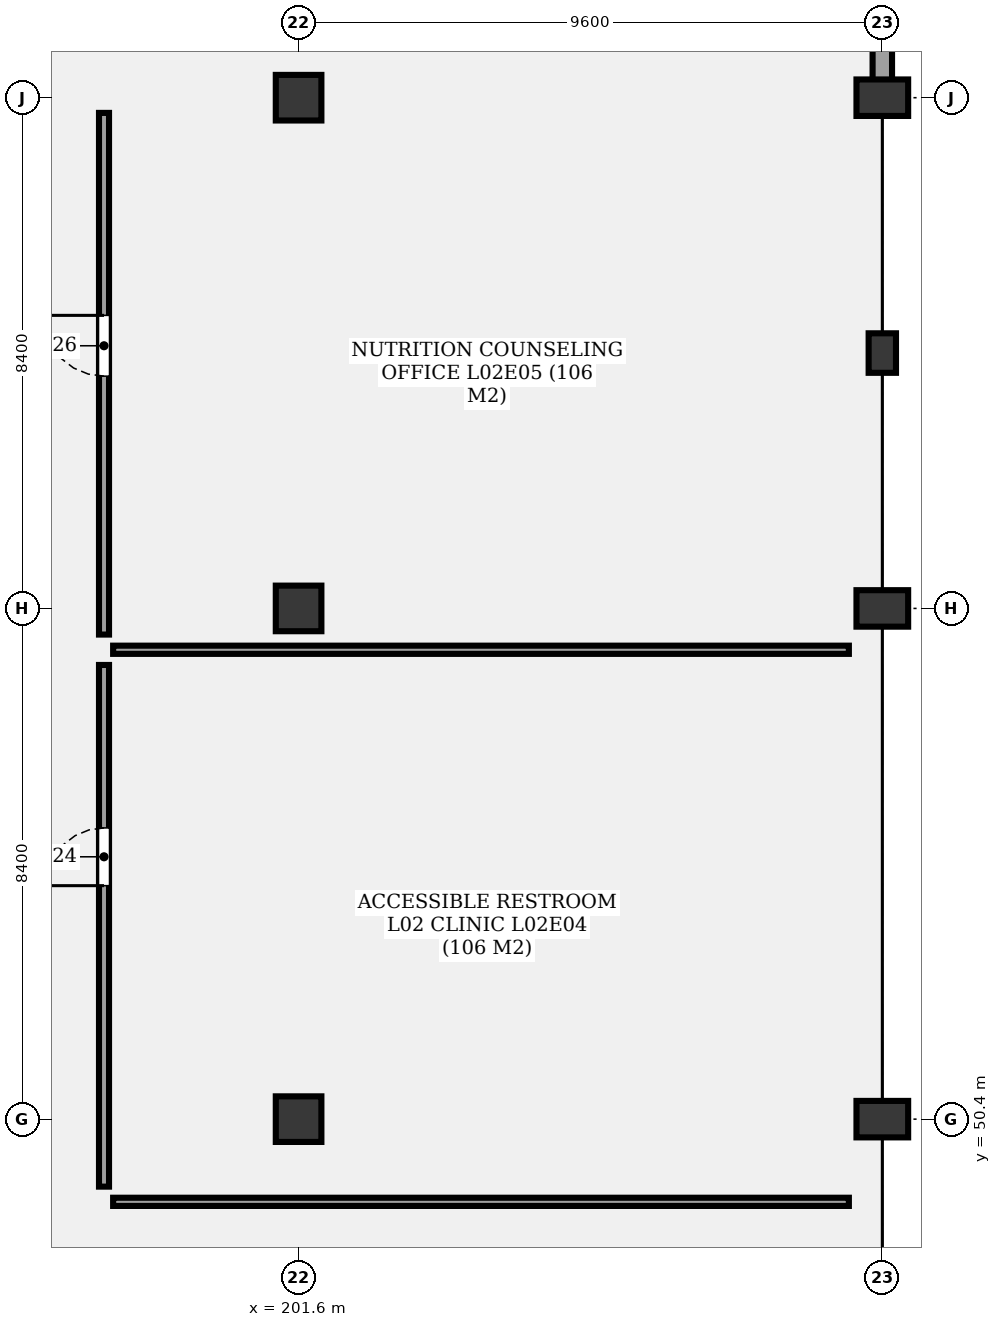
"""IFC4 building model, lengths in metres.
Left out: names, types, materials, properties, quantities, classifications, styles, units other than length and angle.
Written with IfcOpenShell. Run it as: python <this file> out.ifc"""

import sys

from ifc_helpers import new_model, si_unit, direction, frame, frame_2d, origin, origin_2d, place, context, subcontext, project, spatial, rectangle, extrude, element, fill, save


model = new_model("IFC4")
c1 = context("Model", 3, precision=1e-05, world=origin(), true_north=direction((0.0, 1.0)))
c2 = subcontext(c1, "Body", "Model", "MODEL_VIEW")
j1 = project(units=[si_unit("LENGTHUNIT", "METRE"), si_unit("PLANEANGLEUNIT", "RADIAN")], contexts=[c1])
p1 = place(None, origin())
s1 = spatial("IfcSite", under=j1, at=p1, CompositionType="ELEMENT")
p2 = place(p1, origin())
s2 = spatial("IfcBuilding", under=s1, at=p2, CompositionType="ELEMENT")
p3 = place(p2, frame((0.0, 0.0, 9.9)))
s3 = spatial("IfcBuildingStorey", under=s2, at=p3, CompositionType="ELEMENT", Elevation=9.9)
for number, where, z_axis, x_axis in (
    (1, (201.6, 50.4, 0.0), (0.0, 0.0, 1.0), (1.0, 0.0, 0.0)),
    (2, (201.6, 58.8, 0.0), (0.0, 0.0, 1.0), (1.0, 0.0, 0.0)),
    (3, (201.6, 67.2, 0.0), (0.0, 0.0, 1.0), (1.0, 0.0, 0.0)),
):
    element("IfcColumn", number, at=place(p3, frame(where, z_axis=z_axis, x_axis=x_axis)), inside=s3, PredefinedType="COLUMN", context=c2, shape_type="SweptSolid", body=[
        extrude(rectangle(XDim=0.75, YDim=0.75, at=origin_2d()), origin(), (0.0, 0.0, 1.0), 3.6),
    ])
for number, where, z_axis, x_axis in (
    (4, (211.2, 50.4, 0.0), (0.0, 0.0, 1.0), (1.0, 0.0, 0.0)),
    (5, (211.2, 58.8, 0.0), (0.0, 0.0, 1.0), (1.0, 0.0, 0.0)),
    (6, (211.2, 67.2, 0.0), (0.0, 0.0, 1.0), (1.0, 0.0, 0.0)),
):
    element("IfcColumn", number, at=place(p3, frame(where, z_axis=z_axis, x_axis=x_axis)), inside=s3, PredefinedType="COLUMN", context=c2, shape_type="SweptSolid", body=[
        extrude(rectangle(XDim=0.85, YDim=0.6, at=origin_2d()), origin(), (0.0, 0.0, 1.0), 3.6),
    ])
p4 = place(p3, frame((211.2, 63.0, 0.0), z_axis=(0.0, 0.0, 1.0), x_axis=(1.0, 0.0, 0.0)))
e7 = element("IfcColumn", 7, at=p4, inside=s3, PredefinedType="PILASTER", context=c2, shape_type="SweptSolid", body=[
    extrude(rectangle(XDim=0.45, YDim=0.65, at=origin_2d()), origin(), (0.0, 0.0, 1.0), 3.6),
])
p5 = place(p3, frame((211.2, 75.44, 0.0), z_axis=(0.0, 0.0, 1.0), x_axis=(0.0, -1.0, 0.0)))
e8 = element("IfcWall", 8, at=p5, inside=s3, PredefinedType="SOLIDWALL", context=c2, shape_type="SweptSolid", body=[
    extrude(rectangle(XDim=8.24, YDim=0.32, at=frame_2d((4.12, 0.0))), origin(), (0.0, 0.0, 1.0), 2.57),
])
p6 = place(p5, frame((2.62, 0.0, 0.85)))
e9 = element("IfcOpeningElement", 9, at=p6, cuts=e8, PredefinedType="OPENING", context=c2, shape_type="SweptSolid", body=[
    extrude(rectangle(XDim=3.0, YDim=1.2, at=frame_2d((1.5, 0.6))), frame((0.0, 0.17, 0.0), z_axis=(0.0, -1.0, 0.0), x_axis=(1.0, 0.0, 0.0)), (0.0, 0.0, 1.0), 0.34),
])
p7 = place(p3, frame((198.4, 49.29, 0.0), z_axis=(0.0, 0.0, 1.0), x_axis=(0.0, 1.0, 0.0)))
e10 = element("IfcWall", 10, at=p7, inside=s3, PredefinedType="PARTITIONING", context=c2, shape_type="SweptSolid", body=[
    extrude(rectangle(XDim=8.58, YDim=0.165, at=frame_2d((4.29, 0.0))), origin(), (0.0, 0.0, 1.0), 2.48),
])
p8 = place(p7, frame((4.95, 0.0, 0.0)))
e11 = element("IfcOpeningElement", 11, at=p8, cuts=e10, PredefinedType="OPENING", context=c2, shape_type="SweptSolid", body=[
    extrude(rectangle(XDim=0.95, YDim=2.1, at=frame_2d((0.475, 1.05))), frame((0.0, 0.093, 0.0), z_axis=(0.0, -1.0, 0.0), x_axis=(1.0, 0.0, 0.0)), (0.0, 0.0, 1.0), 0.185),
])
p9 = place(p3, frame((198.55, 49.04, 0.0), z_axis=(0.0, 0.0, 1.0), x_axis=(1.0, 0.0, 0.0)))
e12 = element("IfcWall", 12, at=p9, inside=s3, PredefinedType="PARTITIONING", context=c2, shape_type="SweptSolid", body=[
    extrude(rectangle(XDim=12.1, YDim=0.135, at=frame_2d((6.05, 0.0))), origin(), (0.0, 0.0, 1.0), 2.48),
])
p10 = place(p3, frame((198.4, 58.37, 0.0), z_axis=(0.0, 0.0, 1.0), x_axis=(0.0, 1.0, 0.0)))
e13 = element("IfcWall", 13, at=p10, inside=s3, PredefinedType="PARTITIONING", context=c2, shape_type="SweptSolid", body=[
    extrude(rectangle(XDim=8.58, YDim=0.165, at=frame_2d((4.29, 0.0))), origin(), (0.0, 0.0, 1.0), 2.48),
])
p11 = place(p10, frame((4.25, 0.0, 0.0)))
e14 = element("IfcOpeningElement", 14, at=p11, cuts=e13, PredefinedType="OPENING", context=c2, shape_type="SweptSolid", body=[
    extrude(rectangle(XDim=1.0, YDim=2.2, at=frame_2d((0.5, 1.1))), frame((0.0, 0.093, 0.0), z_axis=(0.0, -1.0, 0.0), x_axis=(1.0, 0.0, 0.0)), (0.0, 0.0, 1.0), 0.185),
])
p12 = place(p3, frame((198.55, 58.12, 0.0), z_axis=(0.0, 0.0, 1.0), x_axis=(1.0, 0.0, 0.0)))
e15 = element("IfcWall", 15, at=p12, inside=s3, PredefinedType="PARTITIONING", context=c2, shape_type="SweptSolid", body=[
    extrude(rectangle(XDim=12.1, YDim=0.135, at=frame_2d((6.05, 0.0))), origin(), (0.0, 0.0, 1.0), 2.48),
])
p13 = place(p8, origin())
e16 = element("IfcDoor", 16, at=p13, inside=s3, OperationType="SINGLE_SWING_LEFT", PredefinedType="DOOR", context=c2, shape_type="SweptSolid", body=[
    extrude(rectangle(XDim=0.95, YDim=2.1, at=frame_2d((0.475, 1.05))), frame((0.0, 0.025, 0.0), z_axis=(0.0, -1.0, 0.0), x_axis=(1.0, 0.0, 0.0)), (0.0, 0.0, 1.0), 0.05),
])
fill(e11, e16)
p14 = place(p11, origin())
e17 = element("IfcDoor", 17, at=p14, inside=s3, OperationType="SINGLE_SWING_RIGHT", PredefinedType="DOOR", context=c2, shape_type="SweptSolid", body=[
    extrude(rectangle(XDim=1.0, YDim=2.2, at=frame_2d((0.5, 1.1))), frame((0.0, 0.025, 0.0), z_axis=(0.0, -1.0, 0.0), x_axis=(1.0, 0.0, 0.0)), (0.0, 0.0, 1.0), 0.05),
])
fill(e14, e17)
save(model, sys.argv[1])
